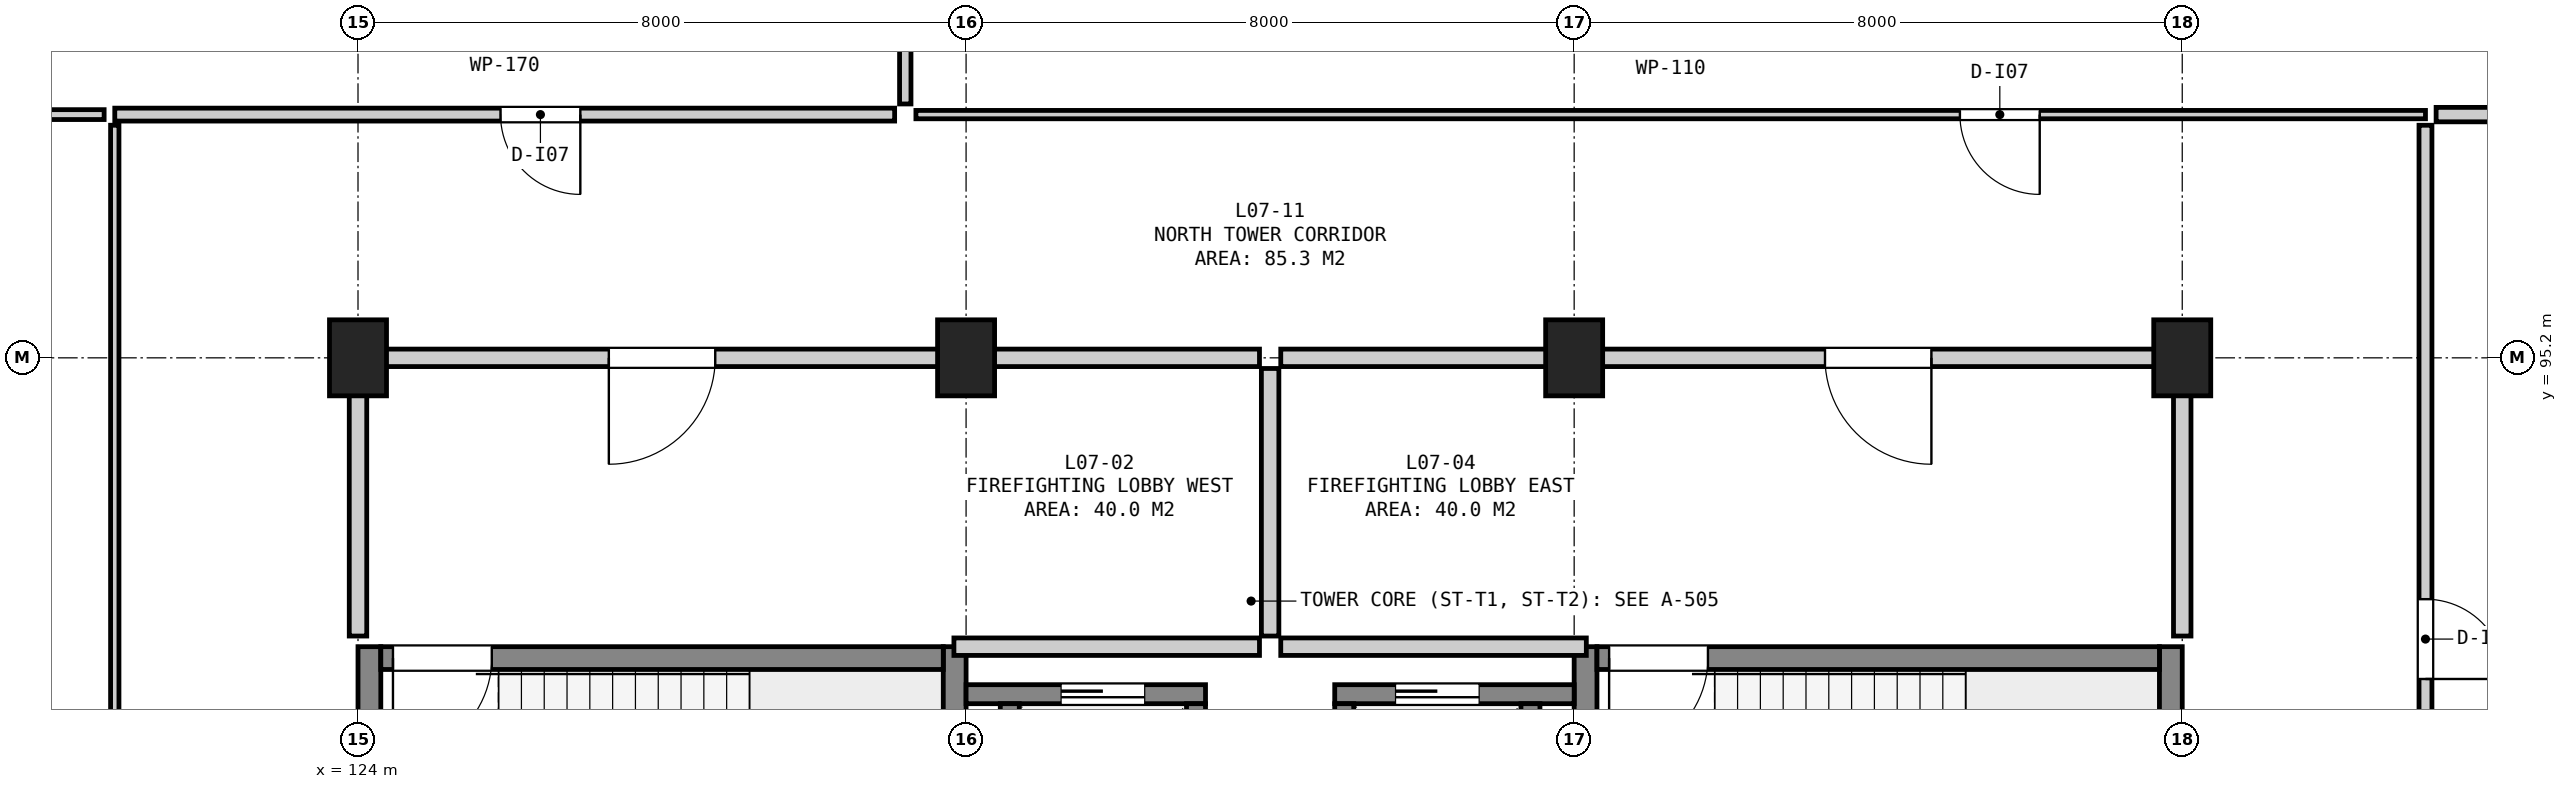
"""IFC4 building model, lengths in metres.
Left out: names, types, materials, properties, quantities, classifications, styles, units other than length and angle.
Written with IfcOpenShell. Run it as: python <this file> out.ifc"""

import sys

from ifc_helpers import new_model, si_unit, direction, frame, frame_2d, origin, origin_2d, place, context, subcontext, project, spatial, rectangle, extrude, element, fill, save


model = new_model("IFC4")
c1 = context("Model", 3, precision=1e-05, world=origin(), true_north=direction((0.0, 1.0)))
c2 = subcontext(c1, "Body", "Model", "MODEL_VIEW")
j1 = project(units=[si_unit("LENGTHUNIT", "METRE"), si_unit("PLANEANGLEUNIT", "RADIAN")], contexts=[c1])
p1 = place(None, origin())
s1 = spatial("IfcSite", under=j1, at=p1, CompositionType="ELEMENT")
p2 = place(p1, origin())
s2 = spatial("IfcBuilding", under=s1, at=p2, CompositionType="ELEMENT")
p3 = place(p2, frame((0.0, 0.0, 31.7)))
s3 = spatial("IfcBuildingStorey", under=s2, at=p3, CompositionType="ELEMENT", Elevation=31.7)
for number, where, z_axis, x_axis in (
    (1, (124.0, 95.2, 0.0), (0.0, 0.0, 1.0), (1.0, 0.0, 0.0)),
    (2, (132.0, 95.2, 0.0), (0.0, 0.0, 1.0), (1.0, 0.0, 0.0)),
    (3, (140.0, 95.2, 0.0), (0.0, 0.0, 1.0), (1.0, 0.0, 0.0)),
    (4, (148.0, 95.2, 0.0), (0.0, 0.0, 1.0), (1.0, 0.0, 0.0)),
):
    element("IfcColumn", number, at=place(p3, frame(where, z_axis=z_axis, x_axis=x_axis)), inside=s3, PredefinedType="COLUMN", context=c2, shape_type="SweptSolid", body=[
        extrude(rectangle(XDim=0.75, YDim=1.0, at=origin_2d()), origin(), (0.0, 0.0, 1.0), 3.9),
    ])
for number, where, z_axis, x_axis in (
    (5, (124.15, 87.2, 0.0), (0.0, 0.0, 1.0), (0.0, 1.0, 0.0)),
    (6, (131.85, 87.2, 0.0), (0.0, 0.0, 1.0), (0.0, 1.0, 0.0)),
):
    element("IfcWall", number, at=place(p3, frame(where, z_axis=z_axis, x_axis=x_axis)), inside=s3, PredefinedType="SHEAR", context=c2, shape_type="SweptSolid", body=[
        extrude(rectangle(XDim=4.2, YDim=0.3, at=frame_2d((2.1, 0.0))), origin(), (0.0, 0.0, 1.0), 3.62),
    ])
p4 = place(p3, frame((124.3, 91.25, 0.0), z_axis=(0.0, 0.0, 1.0), x_axis=(1.0, 0.0, 0.0)))
e7 = element("IfcWall", 7, at=p4, inside=s3, PredefinedType="SHEAR", context=c2, shape_type="SweptSolid", body=[
    extrude(rectangle(XDim=7.4, YDim=0.3, at=frame_2d((3.7, 0.0))), origin(), (0.0, 0.0, 1.0), 3.62),
])
p5 = place(p4, frame((0.16, 0.0, 0.0)))
e8 = element("IfcOpeningElement", 8, at=p5, cuts=e7, PredefinedType="OPENING", context=c2, shape_type="SweptSolid", body=[
    extrude(rectangle(XDim=1.3, YDim=2.18, at=frame_2d((0.65, 1.09))), frame((0.0, 0.162, 0.0), z_axis=(0.0, -1.0, 0.0), x_axis=(1.0, 0.0, 0.0)), (0.0, 0.0, 1.0), 0.324),
])
for number, where, z_axis, x_axis in (
    (9, (140.15, 87.2, 0.0), (0.0, 0.0, 1.0), (0.0, 1.0, 0.0)),
    (10, (147.85, 87.2, 0.0), (0.0, 0.0, 1.0), (0.0, 1.0, 0.0)),
):
    element("IfcWall", number, at=place(p3, frame(where, z_axis=z_axis, x_axis=x_axis)), inside=s3, PredefinedType="SHEAR", context=c2, shape_type="SweptSolid", body=[
        extrude(rectangle(XDim=4.2, YDim=0.3, at=frame_2d((2.1, 0.0))), origin(), (0.0, 0.0, 1.0), 3.62),
    ])
p6 = place(p3, frame((140.3, 91.25, 0.0), z_axis=(0.0, 0.0, 1.0), x_axis=(1.0, 0.0, 0.0)))
e11 = element("IfcWall", 11, at=p6, inside=s3, PredefinedType="SHEAR", context=c2, shape_type="SweptSolid", body=[
    extrude(rectangle(XDim=7.4, YDim=0.3, at=frame_2d((3.7, 0.0))), origin(), (0.0, 0.0, 1.0), 3.62),
])
p7 = place(p6, frame((0.16, 0.0, 0.0)))
e12 = element("IfcOpeningElement", 12, at=p7, cuts=e11, PredefinedType="OPENING", context=c2, shape_type="SweptSolid", body=[
    extrude(rectangle(XDim=1.3, YDim=2.18, at=frame_2d((0.65, 1.09))), frame((0.0, 0.162, 0.0), z_axis=(0.0, -1.0, 0.0), x_axis=(1.0, 0.0, 0.0)), (0.0, 0.0, 1.0), 0.324),
])
p8 = place(p3, frame((132.0, 90.775, 0.0), z_axis=(0.0, 0.0, 1.0), x_axis=(1.0, 0.0, 0.0)))
e13 = element("IfcWall", 13, at=p8, inside=s3, PredefinedType="SHEAR", context=c2, shape_type="SweptSolid", body=[
    extrude(rectangle(XDim=3.15, YDim=0.25, at=frame_2d((1.575, 0.0))), origin(), (0.0, 0.0, 1.0), 3.62),
])
p9 = place(p8, frame((1.25, 0.0, 0.0)))
e14 = element("IfcOpeningElement", 14, at=p9, cuts=e13, PredefinedType="OPENING", context=c2, shape_type="SweptSolid", body=[
    extrude(rectangle(XDim=1.1, YDim=2.15, at=frame_2d((0.55, 1.075))), frame((0.0, 0.137, 0.0), z_axis=(0.0, -1.0, 0.0), x_axis=(1.0, 0.0, 0.0)), (0.0, 0.0, 1.0), 0.274),
])
for number, where, z_axis, x_axis in (
    (15, (132.575, 87.75, 0.0), (0.0, 0.0, 1.0), (0.0, 1.0, 0.0)),
    (16, (135.025, 87.75, 0.0), (0.0, 0.0, 1.0), (0.0, 1.0, 0.0)),
):
    element("IfcWall", number, at=place(p3, frame(where, z_axis=z_axis, x_axis=x_axis)), inside=s3, PredefinedType="SHEAR", context=c2, shape_type="SweptSolid", body=[
        extrude(rectangle(XDim=2.9, YDim=0.25, at=frame_2d((1.45, 0.0))), origin(), (0.0, 0.0, 1.0), 3.62),
    ])
p10 = place(p3, frame((136.85, 90.775, 0.0), z_axis=(0.0, 0.0, 1.0), x_axis=(1.0, 0.0, 0.0)))
e17 = element("IfcWall", 17, at=p10, inside=s3, PredefinedType="SHEAR", context=c2, shape_type="SweptSolid", body=[
    extrude(rectangle(XDim=3.15, YDim=0.25, at=frame_2d((1.575, 0.0))), origin(), (0.0, 0.0, 1.0), 3.62),
])
p11 = place(p10, frame((0.8, 0.0, 0.0)))
e18 = element("IfcOpeningElement", 18, at=p11, cuts=e17, PredefinedType="OPENING", context=c2, shape_type="SweptSolid", body=[
    extrude(rectangle(XDim=1.1, YDim=2.15, at=frame_2d((0.55, 1.075))), frame((0.0, 0.137, 0.0), z_axis=(0.0, -1.0, 0.0), x_axis=(1.0, 0.0, 0.0)), (0.0, 0.0, 1.0), 0.274),
])
for number, where, z_axis, x_axis in (
    (19, (136.975, 87.75, 0.0), (0.0, 0.0, 1.0), (0.0, 1.0, 0.0)),
    (20, (139.425, 87.75, 0.0), (0.0, 0.0, 1.0), (0.0, 1.0, 0.0)),
):
    element("IfcWall", number, at=place(p3, frame(where, z_axis=z_axis, x_axis=x_axis)), inside=s3, PredefinedType="SHEAR", context=c2, shape_type="SweptSolid", body=[
        extrude(rectangle(XDim=2.9, YDim=0.25, at=frame_2d((1.45, 0.0))), origin(), (0.0, 0.0, 1.0), 3.62),
    ])
p12 = place(p3, frame((131.84, 91.4, 0.0), z_axis=(0.0, 0.0, 1.0), x_axis=(1.0, 0.0, 0.0)))
e21 = element("IfcWall", 21, at=p12, inside=s3, PredefinedType="SOLIDWALL", context=c2, shape_type="SweptSolid", body=[
    extrude(rectangle(XDim=4.02, YDim=0.23, at=frame_2d((2.01, 0.0))), origin(), (0.0, 0.0, 1.0), 3.62),
])
p13 = place(p3, frame((124.14, 95.2, 0.0), z_axis=(0.0, 0.0, 1.0), x_axis=(1.0, 0.0, 0.0)))
e22 = element("IfcWall", 22, at=p13, inside=s3, PredefinedType="SOLIDWALL", context=c2, shape_type="SweptSolid", body=[
    extrude(rectangle(XDim=11.72, YDim=0.23, at=frame_2d((5.86, 0.0))), origin(), (0.0, 0.0, 1.0), 2.785),
])
p14 = place(p13, frame((3.16, 0.0, 0.0)))
e23 = element("IfcOpeningElement", 23, at=p14, cuts=e22, PredefinedType="OPENING", context=c2, shape_type="SweptSolid", body=[
    extrude(rectangle(XDim=1.4, YDim=2.2, at=frame_2d((0.7, 1.1))), frame((0.0, 0.127, 0.0), z_axis=(0.0, -1.0, 0.0), x_axis=(1.0, 0.0, 0.0)), (0.0, 0.0, 1.0), 0.254),
])
p15 = place(p3, frame((124.0, 91.54, 0.0), z_axis=(0.0, 0.0, 1.0), x_axis=(0.0, 1.0, 0.0)))
e24 = element("IfcWall", 24, at=p15, inside=s3, PredefinedType="SOLIDWALL", context=c2, shape_type="SweptSolid", body=[
    extrude(rectangle(XDim=3.52, YDim=0.23, at=frame_2d((1.76, 0.0))), origin(), (0.0, 0.0, 1.0), 3.185),
])
p16 = place(p3, frame((136.0, 91.54, 0.0), z_axis=(0.0, 0.0, 1.0), x_axis=(0.0, 1.0, 0.0)))
e25 = element("IfcWall", 25, at=p16, inside=s3, PredefinedType="SOLIDWALL", context=c2, shape_type="SweptSolid", body=[
    extrude(rectangle(XDim=3.52, YDim=0.23, at=frame_2d((1.76, 0.0))), origin(), (0.0, 0.0, 1.0), 3.62),
])
p17 = place(p3, frame((136.14, 91.4, 0.0), z_axis=(0.0, 0.0, 1.0), x_axis=(1.0, 0.0, 0.0)))
e26 = element("IfcWall", 26, at=p17, inside=s3, PredefinedType="SOLIDWALL", context=c2, shape_type="SweptSolid", body=[
    extrude(rectangle(XDim=4.02, YDim=0.23, at=frame_2d((2.01, 0.0))), origin(), (0.0, 0.0, 1.0), 3.62),
])
p18 = place(p3, frame((136.14, 95.2, 0.0), z_axis=(0.0, 0.0, 1.0), x_axis=(1.0, 0.0, 0.0)))
e27 = element("IfcWall", 27, at=p18, inside=s3, PredefinedType="SOLIDWALL", context=c2, shape_type="SweptSolid", body=[
    extrude(rectangle(XDim=11.72, YDim=0.23, at=frame_2d((5.86, 0.0))), origin(), (0.0, 0.0, 1.0), 2.785),
])
p19 = place(p18, frame((7.16, 0.0, 0.0)))
e28 = element("IfcOpeningElement", 28, at=p19, cuts=e27, PredefinedType="OPENING", context=c2, shape_type="SweptSolid", body=[
    extrude(rectangle(XDim=1.4, YDim=2.2, at=frame_2d((0.7, 1.1))), frame((0.0, 0.127, 0.0), z_axis=(0.0, -1.0, 0.0), x_axis=(1.0, 0.0, 0.0)), (0.0, 0.0, 1.0), 0.254),
])
p20 = place(p3, frame((148.0, 91.54, 0.0), z_axis=(0.0, 0.0, 1.0), x_axis=(0.0, 1.0, 0.0)))
e29 = element("IfcWall", 29, at=p20, inside=s3, PredefinedType="SOLIDWALL", context=c2, shape_type="SweptSolid", body=[
    extrude(rectangle(XDim=3.52, YDim=0.23, at=frame_2d((1.76, 0.0))), origin(), (0.0, 0.0, 1.0), 3.035),
])
p21 = place(p3, frame((151.34, 98.4, 0.0), z_axis=(0.0, 0.0, 1.0), x_axis=(1.0, 0.0, 0.0)))
e30 = element("IfcWall", 30, at=p21, inside=s3, PredefinedType="PARTITIONING", context=c2, shape_type="SweptSolid", body=[
    extrude(rectangle(XDim=16.485, YDim=0.19, at=frame_2d((8.242, 0.0))), origin(), (0.0, 0.0, 1.0), 3.62),
])
p22 = place(p3, frame((151.2, 86.54, 0.0), z_axis=(0.0, 0.0, 1.0), x_axis=(0.0, 1.0, 0.0)))
e31 = element("IfcWall", 31, at=p22, inside=s3, PredefinedType="PARTITIONING", context=c2, shape_type="SweptSolid", body=[
    extrude(rectangle(XDim=11.72, YDim=0.17, at=frame_2d((5.86, 0.0))), origin(), (0.0, 0.0, 1.0), 3.62),
])
p23 = place(p22, frame((4.435, 0.0, 0.0)))
e32 = element("IfcOpeningElement", 32, at=p23, cuts=e31, PredefinedType="OPENING", context=c2, shape_type="SweptSolid", body=[
    extrude(rectangle(XDim=1.05, YDim=2.15, at=frame_2d((0.525, 1.075))), frame((0.0, 0.097, 0.0), z_axis=(0.0, -1.0, 0.0), x_axis=(1.0, 0.0, 0.0)), (0.0, 0.0, 1.0), 0.194),
])
p24 = place(p3, frame((110.575, 98.4, 0.0), z_axis=(0.0, 0.0, 1.0), x_axis=(1.0, 0.0, 0.0)))
e33 = element("IfcWall", 33, at=p24, inside=s3, PredefinedType="PARTITIONING", context=c2, shape_type="SweptSolid", body=[
    extrude(rectangle(XDim=10.085, YDim=0.13, at=frame_2d((5.042, 0.0))), origin(), (0.0, 0.0, 1.0), 3.62),
])
p25 = place(p3, frame((120.8, 76.14, 0.0), z_axis=(0.0, 0.0, 1.0), x_axis=(0.0, 1.0, 0.0)))
e34 = element("IfcWall", 34, at=p25, inside=s3, PredefinedType="PARTITIONING", context=c2, shape_type="SweptSolid", body=[
    extrude(rectangle(XDim=22.12, YDim=0.11, at=frame_2d((11.06, 0.0))), origin(), (0.0, 0.0, 1.0), 3.62),
])
p26 = place(p25, frame((10.535, 0.0, 0.0)))
e35 = element("IfcOpeningElement", 35, at=p26, cuts=e34, PredefinedType="OPENING", context=c2, shape_type="SweptSolid", body=[
    extrude(rectangle(XDim=1.05, YDim=2.15, at=frame_2d((0.525, 1.075))), frame((0.0, 0.067, 0.0), z_axis=(0.0, -1.0, 0.0), x_axis=(1.0, 0.0, 0.0)), (0.0, 0.0, 1.0), 0.134),
])
p27 = place(p3, frame((120.8, 98.4, 0.0), z_axis=(0.0, 0.0, 1.0), x_axis=(1.0, 0.0, 0.0)))
e36 = element("IfcWall", 36, at=p27, inside=s3, PredefinedType="PARTITIONING", context=c2, shape_type="SweptSolid", body=[
    extrude(rectangle(XDim=10.26, YDim=0.17, at=frame_2d((5.13, 0.0))), origin(), (0.0, 0.0, 1.0), 3.62),
])
p28 = place(p27, frame((5.075, 0.0, 0.0)))
e37 = element("IfcOpeningElement", 37, at=p28, cuts=e36, PredefinedType="OPENING", context=c2, shape_type="SweptSolid", body=[
    extrude(rectangle(XDim=1.05, YDim=2.15, at=frame_2d((0.525, 1.075))), frame((0.0, 0.097, 0.0), z_axis=(0.0, -1.0, 0.0), x_axis=(1.0, 0.0, 0.0)), (0.0, 0.0, 1.0), 0.194),
])
p29 = place(p3, frame((131.2, 98.54, 0.0), z_axis=(0.0, 0.0, 1.0), x_axis=(0.0, 1.0, 0.0)))
e38 = element("IfcWall", 38, at=p29, inside=s3, PredefinedType="PARTITIONING", context=c2, shape_type="SweptSolid", body=[
    extrude(rectangle(XDim=16.485, YDim=0.15, at=frame_2d((8.242, 0.0))), origin(), (0.0, 0.0, 1.0), 3.62),
])
p30 = place(p3, frame((131.34, 98.4, 0.0), z_axis=(0.0, 0.0, 1.0), x_axis=(1.0, 0.0, 0.0)))
e39 = element("IfcWall", 39, at=p30, inside=s3, PredefinedType="PARTITIONING", context=c2, shape_type="SweptSolid", body=[
    extrude(rectangle(XDim=19.86, YDim=0.11, at=frame_2d((9.93, 0.0))), origin(), (0.0, 0.0, 1.0), 3.62),
])
p31 = place(p30, frame((13.735, 0.0, 0.0)))
e40 = element("IfcOpeningElement", 40, at=p31, cuts=e39, PredefinedType="OPENING", context=c2, shape_type="SweptSolid", body=[
    extrude(rectangle(XDim=1.05, YDim=2.15, at=frame_2d((0.525, 1.075))), frame((0.0, 0.067, 0.0), z_axis=(0.0, -1.0, 0.0), x_axis=(1.0, 0.0, 0.0)), (0.0, 0.0, 1.0), 0.134),
])
p32 = place(p5, frame((1.3, 0.0, 0.0), z_axis=(0.0, 0.0, 1.0), x_axis=(-1.0, 0.0, 0.0)))
e41 = element("IfcDoor", 41, at=p32, inside=s3, OperationType="SINGLE_SWING_RIGHT", PredefinedType="DOOR", context=c2, shape_type="SweptSolid", body=[
    extrude(rectangle(XDim=1.3, YDim=2.18, at=frame_2d((0.65, 1.09))), frame((0.0, 0.025, 0.0), z_axis=(0.0, -1.0, 0.0), x_axis=(1.0, 0.0, 0.0)), (0.0, 0.0, 1.0), 0.05),
])
fill(e8, e41)
p33 = place(p7, frame((1.3, 0.0, 0.0), z_axis=(0.0, 0.0, 1.0), x_axis=(-1.0, 0.0, 0.0)))
e42 = element("IfcDoor", 42, at=p33, inside=s3, OperationType="SINGLE_SWING_RIGHT", PredefinedType="DOOR", context=c2, shape_type="SweptSolid", body=[
    extrude(rectangle(XDim=1.3, YDim=2.18, at=frame_2d((0.65, 1.09))), frame((0.0, 0.025, 0.0), z_axis=(0.0, -1.0, 0.0), x_axis=(1.0, 0.0, 0.0)), (0.0, 0.0, 1.0), 0.05),
])
fill(e12, e42)
p34 = place(p9, origin())
e43 = element("IfcDoor", 43, at=p34, inside=s3, OperationType="SLIDING_TO_LEFT", PredefinedType="DOOR", context=c2, shape_type="SweptSolid", body=[
    extrude(rectangle(XDim=1.1, YDim=2.15, at=frame_2d((0.55, 1.075))), frame((0.0, 0.025, 0.0), z_axis=(0.0, -1.0, 0.0), x_axis=(1.0, 0.0, 0.0)), (0.0, 0.0, 1.0), 0.05),
])
fill(e14, e43)
p35 = place(p11, origin())
e44 = element("IfcDoor", 44, at=p35, inside=s3, OperationType="SLIDING_TO_LEFT", PredefinedType="DOOR", context=c2, shape_type="SweptSolid", body=[
    extrude(rectangle(XDim=1.1, YDim=2.15, at=frame_2d((0.55, 1.075))), frame((0.0, 0.025, 0.0), z_axis=(0.0, -1.0, 0.0), x_axis=(1.0, 0.0, 0.0)), (0.0, 0.0, 1.0), 0.05),
])
fill(e18, e44)
p36 = place(p14, frame((1.4, 0.0, 0.0), z_axis=(0.0, 0.0, 1.0), x_axis=(-1.0, 0.0, 0.0)))
e45 = element("IfcDoor", 45, at=p36, inside=s3, OperationType="SINGLE_SWING_RIGHT", PredefinedType="DOOR", context=c2, shape_type="SweptSolid", body=[
    extrude(rectangle(XDim=1.4, YDim=2.2, at=frame_2d((0.7, 1.1))), frame((0.0, 0.025, 0.0), z_axis=(0.0, -1.0, 0.0), x_axis=(1.0, 0.0, 0.0)), (0.0, 0.0, 1.0), 0.05),
])
fill(e23, e45)
p37 = place(p19, frame((1.4, 0.0, 0.0), z_axis=(0.0, 0.0, 1.0), x_axis=(-1.0, 0.0, 0.0)))
e46 = element("IfcDoor", 46, at=p37, inside=s3, OperationType="SINGLE_SWING_LEFT", PredefinedType="DOOR", context=c2, shape_type="SweptSolid", body=[
    extrude(rectangle(XDim=1.4, YDim=2.2, at=frame_2d((0.7, 1.1))), frame((0.0, 0.025, 0.0), z_axis=(0.0, -1.0, 0.0), x_axis=(1.0, 0.0, 0.0)), (0.0, 0.0, 1.0), 0.05),
])
fill(e28, e46)
p38 = place(p23, frame((1.05, 0.0, 0.0), z_axis=(0.0, 0.0, 1.0), x_axis=(-1.0, 0.0, 0.0)))
e47 = element("IfcDoor", 47, at=p38, inside=s3, OperationType="SINGLE_SWING_RIGHT", PredefinedType="DOOR", context=c2, shape_type="SweptSolid", body=[
    extrude(rectangle(XDim=1.05, YDim=2.15, at=frame_2d((0.525, 1.075))), frame((0.0, 0.025, 0.0), z_axis=(0.0, -1.0, 0.0), x_axis=(1.0, 0.0, 0.0)), (0.0, 0.0, 1.0), 0.05),
])
fill(e32, e47)
p39 = place(p28, frame((1.05, 0.0, 0.0), z_axis=(0.0, 0.0, 1.0), x_axis=(-1.0, 0.0, 0.0)))
e48 = element("IfcDoor", 48, at=p39, inside=s3, OperationType="SINGLE_SWING_LEFT", PredefinedType="DOOR", context=c2, shape_type="SweptSolid", body=[
    extrude(rectangle(XDim=1.05, YDim=2.15, at=frame_2d((0.525, 1.075))), frame((0.0, 0.025, 0.0), z_axis=(0.0, -1.0, 0.0), x_axis=(1.0, 0.0, 0.0)), (0.0, 0.0, 1.0), 0.05),
])
fill(e37, e48)
p40 = place(p31, frame((1.05, 0.0, 0.0), z_axis=(0.0, 0.0, 1.0), x_axis=(-1.0, 0.0, 0.0)))
e49 = element("IfcDoor", 49, at=p40, inside=s3, OperationType="SINGLE_SWING_LEFT", PredefinedType="DOOR", context=c2, shape_type="SweptSolid", body=[
    extrude(rectangle(XDim=1.05, YDim=2.15, at=frame_2d((0.525, 1.075))), frame((0.0, 0.025, 0.0), z_axis=(0.0, -1.0, 0.0), x_axis=(1.0, 0.0, 0.0)), (0.0, 0.0, 1.0), 0.05),
])
fill(e40, e49)
save(model, sys.argv[1])
